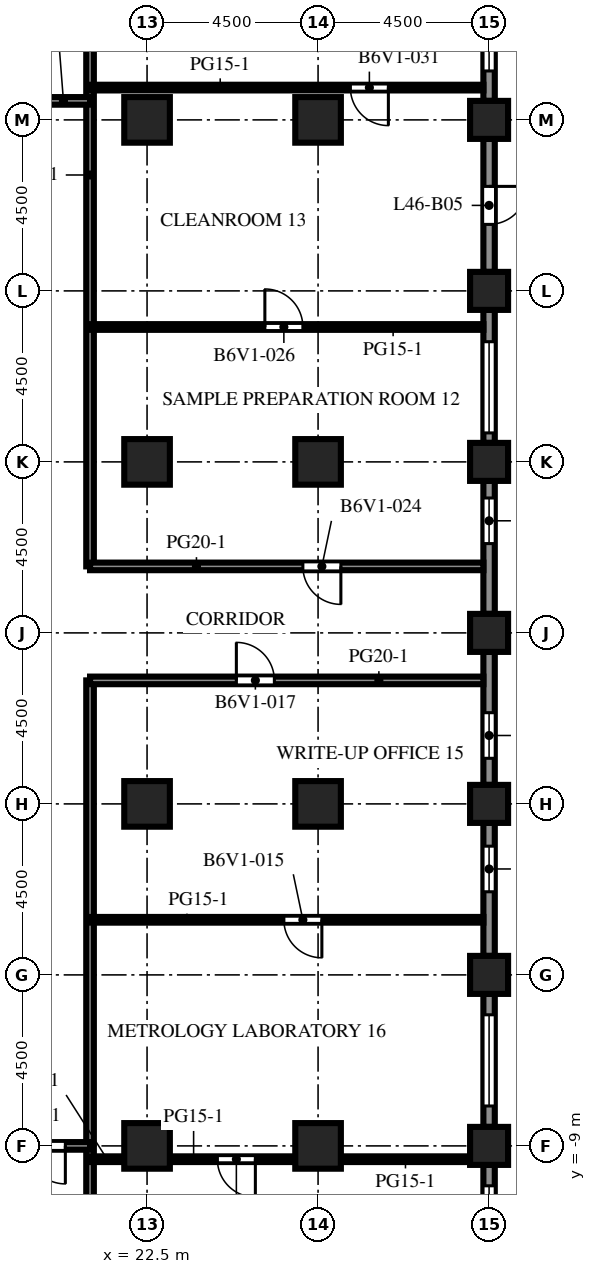
"""IFC4 building model, lengths in metres.
Left out: names, types, materials, properties, quantities, classifications, styles, units other than length and angle.
Written with IfcOpenShell. Run it as: python <this file> out.ifc"""

import sys

from ifc_helpers import new_model, si_unit, direction, frame, frame_2d, origin, origin_2d, place, context, subcontext, project, spatial, rectangle, extrude, element, fill, save


model = new_model("IFC4")
c1 = context("Model", 3, precision=1e-05, world=origin(), true_north=direction((0.0, 1.0)))
c2 = subcontext(c1, "Body", "Model", "MODEL_VIEW")
j1 = project(units=[si_unit("LENGTHUNIT", "METRE"), si_unit("PLANEANGLEUNIT", "RADIAN")], contexts=[c1])
p1 = place(None, origin())
s1 = spatial("IfcSite", under=j1, at=p1, CompositionType="ELEMENT")
p2 = place(p1, origin())
s2 = spatial("IfcBuilding", under=s1, at=p2, CompositionType="ELEMENT")
p3 = place(p2, frame((0.0, 0.0, 203.8)))
s3 = spatial("IfcBuildingStorey", under=s2, at=p3, CompositionType="ELEMENT", Elevation=203.8)
for number, where, z_axis, x_axis in (
    (1, (31.5, -9.0, 0.0), (0.0, 0.0, 1.0), (1.0, 0.0, 0.0)),
    (2, (31.5, -4.5, 0.0), (0.0, 0.0, 1.0), (1.0, 0.0, 0.0)),
    (3, (31.5, 0.0, 0.0), (0.0, 0.0, 1.0), (1.0, 0.0, 0.0)),
    (4, (31.5, 4.5, 0.0), (0.0, 0.0, 1.0), (1.0, 0.0, 0.0)),
    (5, (31.5, 9.0, 0.0), (0.0, 0.0, 1.0), (1.0, 0.0, 0.0)),
    (6, (31.5, 13.5, 0.0), (0.0, 0.0, 1.0), (1.0, 0.0, 0.0)),
    (7, (31.5, 18.0, 0.0), (0.0, 0.0, 1.0), (1.0, 0.0, 0.0)),
):
    element("IfcColumn", number, at=place(p3, frame(where, z_axis=z_axis, x_axis=x_axis)), inside=s3, PredefinedType="COLUMN", context=c2, shape_type="SweptSolid", body=[
        extrude(rectangle(XDim=1.0, YDim=1.0, at=origin_2d()), origin(), (0.0, 0.0, 1.0), 4.1),
    ])
for number, where, z_axis, x_axis in (
    (8, (22.5, -9.0, 0.0), (0.0, 0.0, 1.0), (1.0, 0.0, 0.0)),
    (9, (22.5, 0.0, 0.0), (0.0, 0.0, 1.0), (1.0, 0.0, 0.0)),
    (10, (22.5, 9.0, 0.0), (0.0, 0.0, 1.0), (1.0, 0.0, 0.0)),
    (11, (22.5, 18.0, 0.0), (0.0, 0.0, 1.0), (1.0, 0.0, 0.0)),
    (12, (27.0, -9.0, 0.0), (0.0, 0.0, 1.0), (1.0, 0.0, 0.0)),
    (13, (27.0, 0.0, 0.0), (0.0, 0.0, 1.0), (1.0, 0.0, 0.0)),
    (14, (27.0, 9.0, 0.0), (0.0, 0.0, 1.0), (1.0, 0.0, 0.0)),
    (15, (27.0, 18.0, 0.0), (0.0, 0.0, 1.0), (1.0, 0.0, 0.0)),
):
    element("IfcColumn", number, at=place(p3, frame(where, z_axis=z_axis, x_axis=x_axis)), inside=s3, PredefinedType="COLUMN", context=c2, shape_type="SweptSolid", body=[
        extrude(rectangle(XDim=1.2, YDim=1.2, at=origin_2d()), origin(), (0.0, 0.0, 1.0), 4.1),
    ])
p4 = place(p3, frame((31.5, -9.5, 0.0), z_axis=(0.0, 0.0, 1.0), x_axis=(0.0, -1.0, 0.0)))
e16 = element("IfcWall", 16, at=p4, inside=s3, PredefinedType="SOLIDWALL", context=c2, shape_type="SweptSolid", body=[
    extrude(rectangle(XDim=3.5, YDim=0.3, at=frame_2d((1.75, 0.0))), origin(), (0.0, 0.0, 1.0), 2.85),
])
p5 = place(p4, frame((0.55, 0.0, 0.8)))
e17 = element("IfcOpeningElement", 17, at=p5, cuts=e16, PredefinedType="OPENING", context=c2, shape_type="SweptSolid", body=[
    extrude(rectangle(XDim=2.4, YDim=1.7, at=frame_2d((1.2, 0.85))), frame((0.0, 0.16, 0.0), z_axis=(0.0, -1.0, 0.0), x_axis=(1.0, 0.0, 0.0)), (0.0, 0.0, 1.0), 0.32),
])
p6 = place(p3, frame((31.5, -5.0, 0.0), z_axis=(0.0, 0.0, 1.0), x_axis=(0.0, -1.0, 0.0)))
e18 = element("IfcWall", 18, at=p6, inside=s3, PredefinedType="SOLIDWALL", context=c2, shape_type="SweptSolid", body=[
    extrude(rectangle(XDim=3.5, YDim=0.3, at=frame_2d((1.75, 0.0))), origin(), (0.0, 0.0, 1.0), 2.85),
])
p7 = place(p6, frame((0.55, 0.0, 0.8)))
e19 = element("IfcOpeningElement", 19, at=p7, cuts=e18, PredefinedType="OPENING", context=c2, shape_type="SweptSolid", body=[
    extrude(rectangle(XDim=2.4, YDim=1.7, at=frame_2d((1.2, 0.85))), frame((0.0, 0.16, 0.0), z_axis=(0.0, -1.0, 0.0), x_axis=(1.0, 0.0, 0.0)), (0.0, 0.0, 1.0), 0.32),
])
p8 = place(p3, frame((31.5, -0.5, 0.0), z_axis=(0.0, 0.0, 1.0), x_axis=(0.0, -1.0, 0.0)))
e20 = element("IfcWall", 20, at=p8, inside=s3, PredefinedType="SOLIDWALL", context=c2, shape_type="SweptSolid", body=[
    extrude(rectangle(XDim=3.5, YDim=0.3, at=frame_2d((1.75, 0.0))), origin(), (0.0, 0.0, 1.0), 2.85),
])
p9 = place(p8, frame((0.613, 0.0, 0.8)))
e21 = element("IfcOpeningElement", 21, at=p9, cuts=e20, PredefinedType="OPENING", context=c2, shape_type="SweptSolid", body=[
    extrude(rectangle(XDim=1.2, YDim=1.7, at=frame_2d((0.6, 0.85))), frame((0.0, 0.16, 0.0), z_axis=(0.0, -1.0, 0.0), x_axis=(1.0, 0.0, 0.0)), (0.0, 0.0, 1.0), 0.32),
])
p10 = place(p3, frame((31.5, 4.0, 0.0), z_axis=(0.0, 0.0, 1.0), x_axis=(0.0, -1.0, 0.0)))
e22 = element("IfcWall", 22, at=p10, inside=s3, PredefinedType="SOLIDWALL", context=c2, shape_type="SweptSolid", body=[
    extrude(rectangle(XDim=3.5, YDim=0.3, at=frame_2d((1.75, 0.0))), origin(), (0.0, 0.0, 1.0), 2.85),
])
p11 = place(p10, frame((1.6, 0.0, 0.8)))
e23 = element("IfcOpeningElement", 23, at=p11, cuts=e22, PredefinedType="OPENING", context=c2, shape_type="SweptSolid", body=[
    extrude(rectangle(XDim=1.2, YDim=1.7, at=frame_2d((0.6, 0.85))), frame((0.0, 0.16, 0.0), z_axis=(0.0, -1.0, 0.0), x_axis=(1.0, 0.0, 0.0)), (0.0, 0.0, 1.0), 0.32),
])
p12 = place(p3, frame((31.5, 8.5, 0.0), z_axis=(0.0, 0.0, 1.0), x_axis=(0.0, -1.0, 0.0)))
e24 = element("IfcWall", 24, at=p12, inside=s3, PredefinedType="SOLIDWALL", context=c2, shape_type="SweptSolid", body=[
    extrude(rectangle(XDim=3.5, YDim=0.3, at=frame_2d((1.75, 0.0))), origin(), (0.0, 0.0, 1.0), 2.85),
])
p13 = place(p12, frame((0.45, 0.0, 0.8)))
e25 = element("IfcOpeningElement", 25, at=p13, cuts=e24, PredefinedType="OPENING", context=c2, shape_type="SweptSolid", body=[
    extrude(rectangle(XDim=1.2, YDim=1.7, at=frame_2d((0.6, 0.85))), frame((0.0, 0.16, 0.0), z_axis=(0.0, -1.0, 0.0), x_axis=(1.0, 0.0, 0.0)), (0.0, 0.0, 1.0), 0.32),
])
p14 = place(p3, frame((31.5, 13.0, 0.0), z_axis=(0.0, 0.0, 1.0), x_axis=(0.0, -1.0, 0.0)))
e26 = element("IfcWall", 26, at=p14, inside=s3, PredefinedType="SOLIDWALL", context=c2, shape_type="SweptSolid", body=[
    extrude(rectangle(XDim=3.5, YDim=0.3, at=frame_2d((1.75, 0.0))), origin(), (0.0, 0.0, 1.0), 2.85),
])
p15 = place(p14, frame((0.837, 0.0, 0.8)))
e27 = element("IfcOpeningElement", 27, at=p15, cuts=e26, PredefinedType="OPENING", context=c2, shape_type="SweptSolid", body=[
    extrude(rectangle(XDim=2.4, YDim=1.7, at=frame_2d((1.2, 0.85))), frame((0.0, 0.16, 0.0), z_axis=(0.0, -1.0, 0.0), x_axis=(1.0, 0.0, 0.0)), (0.0, 0.0, 1.0), 0.32),
])
p16 = place(p3, frame((31.5, 17.5, 0.0), z_axis=(0.0, 0.0, 1.0), x_axis=(0.0, -1.0, 0.0)))
e28 = element("IfcWall", 28, at=p16, inside=s3, PredefinedType="SOLIDWALL", context=c2, shape_type="SweptSolid", body=[
    extrude(rectangle(XDim=3.5, YDim=0.3, at=frame_2d((1.75, 0.0))), origin(), (0.0, 0.0, 1.0), 2.85),
])
p17 = place(p16, frame((1.25, 0.0, 0.0)))
e29 = element("IfcOpeningElement", 29, at=p17, cuts=e28, PredefinedType="OPENING", context=c2, shape_type="SweptSolid", body=[
    extrude(rectangle(XDim=1.0, YDim=2.2, at=frame_2d((0.5, 1.1))), frame((0.0, 0.16, 0.0), z_axis=(0.0, -1.0, 0.0), x_axis=(1.0, 0.0, 0.0)), (0.0, 0.0, 1.0), 0.32),
])
p18 = place(p3, frame((31.5, 22.0, 0.0), z_axis=(0.0, 0.0, 1.0), x_axis=(0.0, -1.0, 0.0)))
e30 = element("IfcWall", 30, at=p18, inside=s3, PredefinedType="SOLIDWALL", context=c2, shape_type="SweptSolid", body=[
    extrude(rectangle(XDim=3.5, YDim=0.3, at=frame_2d((1.75, 0.0))), origin(), (0.0, 0.0, 1.0), 2.85),
])
p19 = place(p18, frame((0.312, 0.0, 0.8)))
e31 = element("IfcOpeningElement", 31, at=p19, cuts=e30, PredefinedType="OPENING", context=c2, shape_type="SweptSolid", body=[
    extrude(rectangle(XDim=2.4, YDim=1.7, at=frame_2d((1.2, 0.85))), frame((0.0, 0.16, 0.0), z_axis=(0.0, -1.0, 0.0), x_axis=(1.0, 0.0, 0.0)), (0.0, 0.0, 1.0), 0.32),
])
p20 = place(p3, frame((21.0, -26.85, 0.0), z_axis=(0.0, 0.0, 1.0), x_axis=(0.0, 1.0, 0.0)))
e32 = element("IfcWall", 32, at=p20, inside=s3, PredefinedType="PARTITIONING", context=c2, shape_type="SweptSolid", body=[
    extrude(rectangle(XDim=30.1, YDim=0.2, at=frame_2d((15.05, 0.0))), origin(), (0.0, 0.0, 1.0), 3.65),
])
p21 = place(p3, frame((21.0, 6.25, 0.0), z_axis=(0.0, 0.0, 1.0), x_axis=(0.0, 1.0, 0.0)))
e33 = element("IfcWall", 33, at=p21, inside=s3, PredefinedType="PARTITIONING", context=c2, shape_type="SweptSolid", body=[
    extrude(rectangle(XDim=20.6, YDim=0.2, at=frame_2d((10.3, 0.0))), origin(), (0.0, 0.0, 1.0), 3.65),
])
p22 = place(p3, frame((21.0, -9.35, 0.0), z_axis=(0.0, 0.0, 1.0), x_axis=(1.0, 0.0, 0.0)))
e34 = element("IfcWall", 34, at=p22, inside=s3, PredefinedType="PARTITIONING", context=c2, shape_type="SweptSolid", body=[
    extrude(rectangle(XDim=0.9, YDim=0.15, at=frame_2d((0.45, 0.0))), origin(), (0.0, 0.0, 1.0), 3.65),
])
p23 = place(p3, frame((26.4, -9.35, 0.0), z_axis=(0.0, 0.0, 1.0), x_axis=(-1.0, 0.0, 0.0)))
e35 = element("IfcWall", 35, at=p23, inside=s3, PredefinedType="PARTITIONING", context=c2, shape_type="SweptSolid", body=[
    extrude(rectangle(XDim=3.3, YDim=0.15, at=frame_2d((1.65, 0.0))), origin(), (0.0, 0.0, 1.0), 3.65),
])
p24 = place(p23, frame((1.05, 0.0, 0.0)))
e36 = element("IfcOpeningElement", 36, at=p24, cuts=e35, PredefinedType="OPENING", context=c2, shape_type="SweptSolid", body=[
    extrude(rectangle(XDim=1.0, YDim=2.1, at=frame_2d((0.5, 1.05))), frame((0.0, 0.085, 0.0), z_axis=(0.0, -1.0, 0.0), x_axis=(1.0, 0.0, 0.0)), (0.0, 0.0, 1.0), 0.17),
])
p25 = place(p3, frame((27.6, -9.35, 0.0), z_axis=(0.0, 0.0, 1.0), x_axis=(1.0, 0.0, 0.0)))
e37 = element("IfcWall", 37, at=p25, inside=s3, PredefinedType="PARTITIONING", context=c2, shape_type="SweptSolid", body=[
    extrude(rectangle(XDim=3.4, YDim=0.15, at=frame_2d((1.7, 0.0))), origin(), (0.0, 0.0, 1.0), 3.65),
])
p26 = place(p3, frame((21.0, -9.0, 0.0), z_axis=(0.0, 0.0, 1.0), x_axis=(-1.0, 0.0, 0.0)))
e38 = element("IfcWall", 38, at=p26, inside=s3, PredefinedType="PARTITIONING", context=c2, shape_type="SweptSolid", body=[
    extrude(rectangle(XDim=3.0, YDim=0.2, at=frame_2d((1.5, 0.0))), origin(), (0.0, 0.0, 1.0), 3.65),
])
p27 = place(p26, frame((0.65, 0.0, 0.0)))
e39 = element("IfcOpeningElement", 39, at=p27, cuts=e38, PredefinedType="OPENING", context=c2, shape_type="SweptSolid", body=[
    extrude(rectangle(XDim=1.0, YDim=2.1, at=frame_2d((0.5, 1.05))), frame((0.0, 0.11, 0.0), z_axis=(0.0, -1.0, 0.0), x_axis=(1.0, 0.0, 0.0)), (0.0, 0.0, 1.0), 0.22),
])
p28 = place(p3, frame((31.35, -3.05, 0.0), z_axis=(0.0, 0.0, 1.0), x_axis=(-1.0, 0.0, 0.0)))
e40 = element("IfcWall", 40, at=p28, inside=s3, PredefinedType="PARTITIONING", context=c2, shape_type="SweptSolid", body=[
    extrude(rectangle(XDim=10.35, YDim=0.15, at=frame_2d((5.175, 0.0))), origin(), (0.0, 0.0, 1.0), 3.65),
])
p29 = place(p28, frame((4.25, 0.0, 0.0)))
e41 = element("IfcOpeningElement", 41, at=p29, cuts=e40, PredefinedType="OPENING", context=c2, shape_type="SweptSolid", body=[
    extrude(rectangle(XDim=1.0, YDim=2.1, at=frame_2d((0.5, 1.05))), frame((0.0, 0.085, 0.0), z_axis=(0.0, -1.0, 0.0), x_axis=(1.0, 0.0, 0.0)), (0.0, 0.0, 1.0), 0.17),
])
p30 = place(p3, frame((31.35, 3.25, 0.0), z_axis=(0.0, 0.0, 1.0), x_axis=(-1.0, 0.0, 0.0)))
e42 = element("IfcWall", 42, at=p30, inside=s3, PredefinedType="PARTITIONING", context=c2, shape_type="SweptSolid", body=[
    extrude(rectangle(XDim=10.35, YDim=0.2, at=frame_2d((5.175, 0.0))), origin(), (0.0, 0.0, 1.0), 3.65),
])
p31 = place(p30, frame((5.5, 0.0, 0.0)))
e43 = element("IfcOpeningElement", 43, at=p31, cuts=e42, PredefinedType="OPENING", context=c2, shape_type="SweptSolid", body=[
    extrude(rectangle(XDim=1.0, YDim=2.1, at=frame_2d((0.5, 1.05))), frame((0.0, 0.11, 0.0), z_axis=(0.0, -1.0, 0.0), x_axis=(1.0, 0.0, 0.0)), (0.0, 0.0, 1.0), 0.22),
])
p32 = place(p3, frame((21.0, 6.25, 0.0), z_axis=(0.0, 0.0, 1.0), x_axis=(1.0, 0.0, 0.0)))
e44 = element("IfcWall", 44, at=p32, inside=s3, PredefinedType="PARTITIONING", context=c2, shape_type="SweptSolid", body=[
    extrude(rectangle(XDim=10.35, YDim=0.2, at=frame_2d((5.175, 0.0))), origin(), (0.0, 0.0, 1.0), 3.65),
])
p33 = place(p32, frame((5.6, 0.0, 0.0)))
e45 = element("IfcOpeningElement", 45, at=p33, cuts=e44, PredefinedType="OPENING", context=c2, shape_type="SweptSolid", body=[
    extrude(rectangle(XDim=1.0, YDim=2.1, at=frame_2d((0.5, 1.05))), frame((0.0, 0.11, 0.0), z_axis=(0.0, -1.0, 0.0), x_axis=(1.0, 0.0, 0.0)), (0.0, 0.0, 1.0), 0.22),
])
p34 = place(p3, frame((21.0, 12.55, 0.0), z_axis=(0.0, 0.0, 1.0), x_axis=(1.0, 0.0, 0.0)))
e46 = element("IfcWall", 46, at=p34, inside=s3, PredefinedType="PARTITIONING", context=c2, shape_type="SweptSolid", body=[
    extrude(rectangle(XDim=10.35, YDim=0.15, at=frame_2d((5.175, 0.0))), origin(), (0.0, 0.0, 1.0), 3.65),
])
p35 = place(p34, frame((4.6, 0.0, 0.0)))
e47 = element("IfcOpeningElement", 47, at=p35, cuts=e46, PredefinedType="OPENING", context=c2, shape_type="SweptSolid", body=[
    extrude(rectangle(XDim=1.0, YDim=2.1, at=frame_2d((0.5, 1.05))), frame((0.0, 0.085, 0.0), z_axis=(0.0, -1.0, 0.0), x_axis=(1.0, 0.0, 0.0)), (0.0, 0.0, 1.0), 0.17),
])
p36 = place(p3, frame((18.0, 18.5, 0.0), z_axis=(0.0, 0.0, 1.0), x_axis=(1.0, 0.0, 0.0)))
e48 = element("IfcWall", 48, at=p36, inside=s3, PredefinedType="PARTITIONING", context=c2, shape_type="SweptSolid", body=[
    extrude(rectangle(XDim=3.0, YDim=0.2, at=frame_2d((1.5, 0.0))), origin(), (0.0, 0.0, 1.0), 3.65),
])
p37 = place(p36, frame((0.6, 0.0, 0.0)))
e49 = element("IfcOpeningElement", 49, at=p37, cuts=e48, PredefinedType="OPENING", context=c2, shape_type="SweptSolid", body=[
    extrude(rectangle(XDim=1.0, YDim=2.1, at=frame_2d((0.5, 1.05))), frame((0.0, 0.11, 0.0), z_axis=(0.0, -1.0, 0.0), x_axis=(1.0, 0.0, 0.0)), (0.0, 0.0, 1.0), 0.22),
])
p38 = place(p3, frame((21.0, 18.85, 0.0), z_axis=(0.0, 0.0, 1.0), x_axis=(1.0, 0.0, 0.0)))
e50 = element("IfcWall", 50, at=p38, inside=s3, PredefinedType="PARTITIONING", context=c2, shape_type="SweptSolid", body=[
    extrude(rectangle(XDim=10.35, YDim=0.15, at=frame_2d((5.175, 0.0))), origin(), (0.0, 0.0, 1.0), 3.65),
])
p39 = place(p38, frame((6.85, 0.0, 0.0)))
e51 = element("IfcOpeningElement", 51, at=p39, cuts=e50, PredefinedType="OPENING", context=c2, shape_type="SweptSolid", body=[
    extrude(rectangle(XDim=1.0, YDim=2.1, at=frame_2d((0.5, 1.05))), frame((0.0, 0.085, 0.0), z_axis=(0.0, -1.0, 0.0), x_axis=(1.0, 0.0, 0.0)), (0.0, 0.0, 1.0), 0.17),
])
p40 = place(p5, origin())
e52 = element("IfcWindow", 52, at=p40, inside=s3, PartitioningType="SINGLE_PANEL", PredefinedType="WINDOW", context=c2, shape_type="SweptSolid", body=[
    extrude(rectangle(XDim=2.4, YDim=1.7, at=frame_2d((1.2, 0.85))), frame((0.0, 0.03, 0.0), z_axis=(0.0, -1.0, 0.0), x_axis=(1.0, 0.0, 0.0)), (0.0, 0.0, 1.0), 0.06),
])
fill(e17, e52)
p41 = place(p7, origin())
e53 = element("IfcWindow", 53, at=p41, inside=s3, PartitioningType="SINGLE_PANEL", PredefinedType="WINDOW", context=c2, shape_type="SweptSolid", body=[
    extrude(rectangle(XDim=2.4, YDim=1.7, at=frame_2d((1.2, 0.85))), frame((0.0, 0.03, 0.0), z_axis=(0.0, -1.0, 0.0), x_axis=(1.0, 0.0, 0.0)), (0.0, 0.0, 1.0), 0.06),
])
fill(e19, e53)
p42 = place(p9, origin())
e54 = element("IfcWindow", 54, at=p42, inside=s3, PartitioningType="SINGLE_PANEL", PredefinedType="WINDOW", context=c2, shape_type="SweptSolid", body=[
    extrude(rectangle(XDim=1.2, YDim=1.7, at=frame_2d((0.6, 0.85))), frame((0.0, 0.03, 0.0), z_axis=(0.0, -1.0, 0.0), x_axis=(1.0, 0.0, 0.0)), (0.0, 0.0, 1.0), 0.06),
])
fill(e21, e54)
p43 = place(p11, origin())
e55 = element("IfcWindow", 55, at=p43, inside=s3, PartitioningType="SINGLE_PANEL", PredefinedType="WINDOW", context=c2, shape_type="SweptSolid", body=[
    extrude(rectangle(XDim=1.2, YDim=1.7, at=frame_2d((0.6, 0.85))), frame((0.0, 0.03, 0.0), z_axis=(0.0, -1.0, 0.0), x_axis=(1.0, 0.0, 0.0)), (0.0, 0.0, 1.0), 0.06),
])
fill(e23, e55)
p44 = place(p13, origin())
e56 = element("IfcWindow", 56, at=p44, inside=s3, PartitioningType="SINGLE_PANEL", PredefinedType="WINDOW", context=c2, shape_type="SweptSolid", body=[
    extrude(rectangle(XDim=1.2, YDim=1.7, at=frame_2d((0.6, 0.85))), frame((0.0, 0.03, 0.0), z_axis=(0.0, -1.0, 0.0), x_axis=(1.0, 0.0, 0.0)), (0.0, 0.0, 1.0), 0.06),
])
fill(e25, e56)
p45 = place(p15, origin())
e57 = element("IfcWindow", 57, at=p45, inside=s3, PartitioningType="SINGLE_PANEL", PredefinedType="WINDOW", context=c2, shape_type="SweptSolid", body=[
    extrude(rectangle(XDim=2.4, YDim=1.7, at=frame_2d((1.2, 0.85))), frame((0.0, 0.03, 0.0), z_axis=(0.0, -1.0, 0.0), x_axis=(1.0, 0.0, 0.0)), (0.0, 0.0, 1.0), 0.06),
])
fill(e27, e57)
p46 = place(p17, origin())
e58 = element("IfcDoor", 58, at=p46, inside=s3, OperationType="SINGLE_SWING_LEFT", PredefinedType="DOOR", context=c2, shape_type="SweptSolid", body=[
    extrude(rectangle(XDim=1.0, YDim=2.2, at=frame_2d((0.5, 1.1))), frame((0.0, 0.025, 0.0), z_axis=(0.0, -1.0, 0.0), x_axis=(1.0, 0.0, 0.0)), (0.0, 0.0, 1.0), 0.05),
])
fill(e29, e58)
p47 = place(p19, origin())
e59 = element("IfcWindow", 59, at=p47, inside=s3, PartitioningType="SINGLE_PANEL", PredefinedType="WINDOW", context=c2, shape_type="SweptSolid", body=[
    extrude(rectangle(XDim=2.4, YDim=1.7, at=frame_2d((1.2, 0.85))), frame((0.0, 0.03, 0.0), z_axis=(0.0, -1.0, 0.0), x_axis=(1.0, 0.0, 0.0)), (0.0, 0.0, 1.0), 0.06),
])
fill(e31, e59)
p48 = place(p24, origin())
e60 = element("IfcDoor", 60, at=p48, inside=s3, OperationType="SINGLE_SWING_LEFT", PredefinedType="DOOR", context=c2, shape_type="SweptSolid", body=[
    extrude(rectangle(XDim=1.0, YDim=2.1, at=frame_2d((0.5, 1.05))), frame((0.0, 0.025, 0.0), z_axis=(0.0, -1.0, 0.0), x_axis=(1.0, 0.0, 0.0)), (0.0, 0.0, 1.0), 0.05),
])
fill(e36, e60)
p49 = place(p27, origin())
e61 = element("IfcDoor", 61, at=p49, inside=s3, OperationType="SINGLE_SWING_LEFT", PredefinedType="DOOR", context=c2, shape_type="SweptSolid", body=[
    extrude(rectangle(XDim=1.0, YDim=2.1, at=frame_2d((0.5, 1.05))), frame((0.0, 0.025, 0.0), z_axis=(0.0, -1.0, 0.0), x_axis=(1.0, 0.0, 0.0)), (0.0, 0.0, 1.0), 0.05),
])
fill(e39, e61)
p50 = place(p29, origin())
e62 = element("IfcDoor", 62, at=p50, inside=s3, OperationType="SINGLE_SWING_LEFT", PredefinedType="DOOR", context=c2, shape_type="SweptSolid", body=[
    extrude(rectangle(XDim=1.0, YDim=2.1, at=frame_2d((0.5, 1.05))), frame((0.0, 0.025, 0.0), z_axis=(0.0, -1.0, 0.0), x_axis=(1.0, 0.0, 0.0)), (0.0, 0.0, 1.0), 0.05),
])
fill(e41, e62)
p51 = place(p31, origin())
e63 = element("IfcDoor", 63, at=p51, inside=s3, OperationType="SINGLE_SWING_RIGHT", PredefinedType="DOOR", context=c2, shape_type="SweptSolid", body=[
    extrude(rectangle(XDim=1.0, YDim=2.1, at=frame_2d((0.5, 1.05))), frame((0.0, 0.025, 0.0), z_axis=(0.0, -1.0, 0.0), x_axis=(1.0, 0.0, 0.0)), (0.0, 0.0, 1.0), 0.05),
])
fill(e43, e63)
p52 = place(p33, origin())
e64 = element("IfcDoor", 64, at=p52, inside=s3, OperationType="SINGLE_SWING_RIGHT", PredefinedType="DOOR", context=c2, shape_type="SweptSolid", body=[
    extrude(rectangle(XDim=1.0, YDim=2.1, at=frame_2d((0.5, 1.05))), frame((0.0, 0.025, 0.0), z_axis=(0.0, -1.0, 0.0), x_axis=(1.0, 0.0, 0.0)), (0.0, 0.0, 1.0), 0.05),
])
fill(e45, e64)
p53 = place(p35, origin())
e65 = element("IfcDoor", 65, at=p53, inside=s3, OperationType="SINGLE_SWING_LEFT", PredefinedType="DOOR", context=c2, shape_type="SweptSolid", body=[
    extrude(rectangle(XDim=1.0, YDim=2.1, at=frame_2d((0.5, 1.05))), frame((0.0, 0.025, 0.0), z_axis=(0.0, -1.0, 0.0), x_axis=(1.0, 0.0, 0.0)), (0.0, 0.0, 1.0), 0.05),
])
fill(e47, e65)
p54 = place(p39, origin())
e66 = element("IfcDoor", 66, at=p54, inside=s3, OperationType="SINGLE_SWING_RIGHT", PredefinedType="DOOR", context=c2, shape_type="SweptSolid", body=[
    extrude(rectangle(XDim=1.0, YDim=2.1, at=frame_2d((0.5, 1.05))), frame((0.0, 0.025, 0.0), z_axis=(0.0, -1.0, 0.0), x_axis=(1.0, 0.0, 0.0)), (0.0, 0.0, 1.0), 0.05),
])
fill(e51, e66)
save(model, sys.argv[1])
